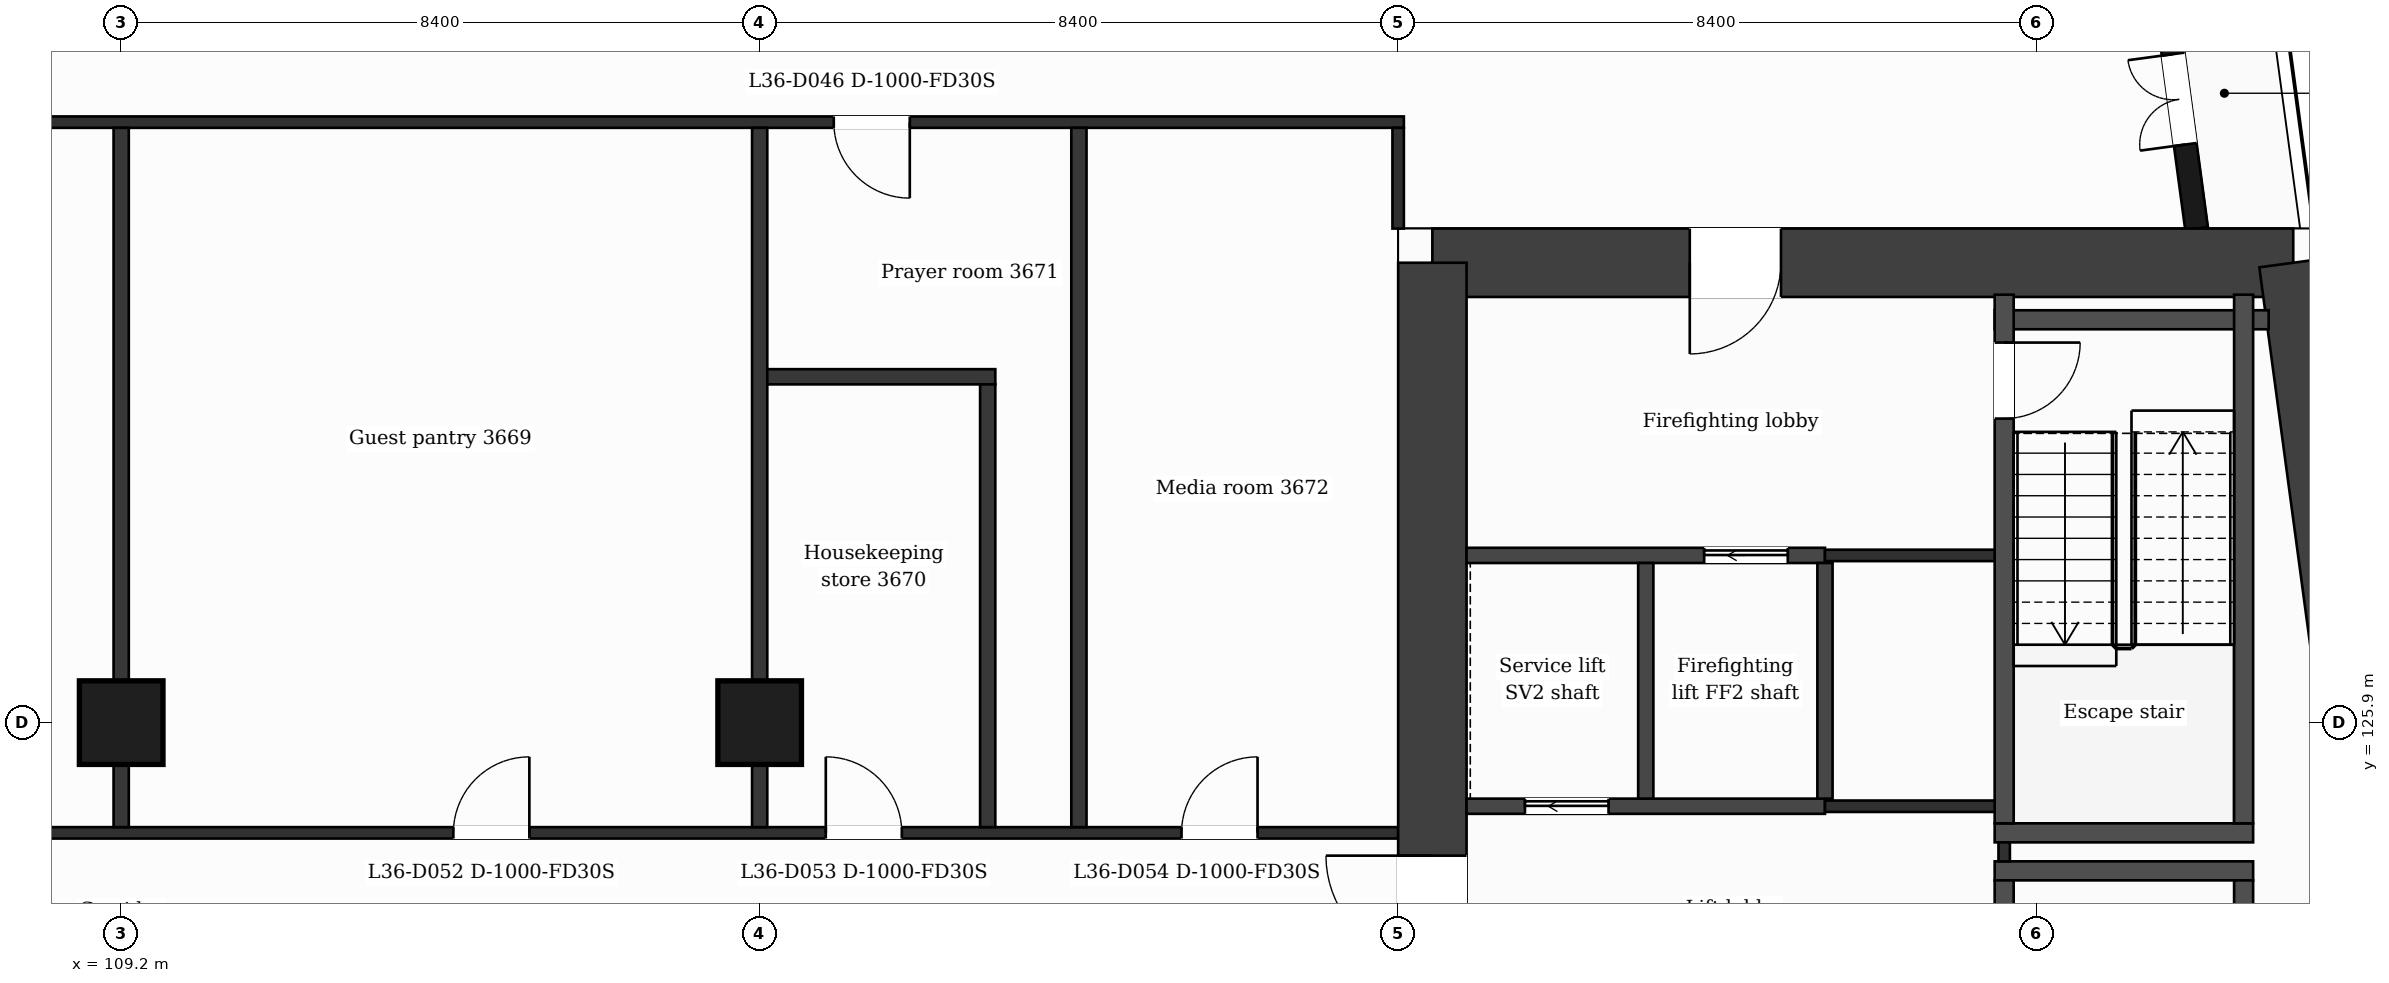
"""IFC4 building model, lengths in metres.
Left out: names, types, materials, properties, quantities, classifications, styles, units other than length and angle.
Written with IfcOpenShell. Run it as: python <this file> out.ifc"""

import sys

from ifc_helpers import new_model, si_unit, direction, frame, frame_2d, origin, origin_2d, place, context, subcontext, project, spatial, rectangle, extrude, element, fill, save


model = new_model("IFC4")
c1 = context("Model", 3, precision=1e-05, world=origin(), true_north=direction((0.0, 1.0)))
c2 = subcontext(c1, "Body", "Model", "MODEL_VIEW")
j1 = project(units=[si_unit("LENGTHUNIT", "METRE"), si_unit("PLANEANGLEUNIT", "RADIAN")], contexts=[c1])
p1 = place(None, origin())
s1 = spatial("IfcSite", under=j1, at=p1, CompositionType="ELEMENT")
p2 = place(p1, origin())
s2 = spatial("IfcBuilding", under=s1, at=p2, CompositionType="ELEMENT")
p3 = place(p2, frame((0.0, 0.0, 155.2)))
s3 = spatial("IfcBuildingStorey", under=s2, at=p3, CompositionType="ELEMENT", Elevation=155.2)
p4 = place(p3, frame((126.45, 131.95, 0.0), z_axis=(0.0, 0.0, 1.0), x_axis=(1.0, 0.0, 0.0)))
e1 = element("IfcWall", 1, at=p4, inside=s3, PredefinedType="SHEAR", context=c2, shape_type="SweptSolid", body=[
    extrude(rectangle(XDim=11.326, YDim=0.9, at=frame_2d((5.663, 0.0))), origin(), (0.0, 0.0, 1.0), 3.7),
])
p5 = place(p4, frame((3.386, 0.0, 0.0)))
e2 = element("IfcOpeningElement", 2, at=p5, cuts=e1, PredefinedType="OPENING", context=c2, shape_type="SweptSolid", body=[
    extrude(rectangle(XDim=1.2, YDim=2.1, at=frame_2d((0.6, 1.05))), frame((0.0, 0.46, 0.0), z_axis=(0.0, -1.0, 0.0), x_axis=(1.0, 0.0, 0.0)), (0.0, 0.0, 1.0), 0.92),
])
p6 = place(p3, frame((137.776, 131.95, 0.0), z_axis=(0.0, 0.0, 1.0), x_axis=(0.133421759112, -0.991059349482, 0.0)))
e3 = element("IfcWall", 3, at=p6, inside=s3, PredefinedType="SHEAR", context=c2, shape_type="SweptSolid", body=[
    extrude(rectangle(XDim=21.29, YDim=0.9, at=frame_2d((10.645, 0.0))), origin(), (0.0, 0.0, 1.0), 3.7),
])
p7 = place(p3, frame((126.45, 110.85, 0.0), z_axis=(0.0, 0.0, 1.0), x_axis=(0.0, 1.0, 0.0)))
e4 = element("IfcWall", 4, at=p7, inside=s3, PredefinedType="SHEAR", context=c2, shape_type="SweptSolid", body=[
    extrude(rectangle(XDim=21.1, YDim=0.9, at=frame_2d((10.55, 0.0))), origin(), (0.0, 0.0, 1.0), 3.7),
])
p8 = place(p7, frame((11.9, 0.0, 0.0)))
e5 = element("IfcOpeningElement", 5, at=p8, cuts=e4, PredefinedType="OPENING", context=c2, shape_type="SweptSolid", body=[
    extrude(rectangle(XDim=1.4, YDim=2.1, at=frame_2d((0.7, 1.05))), frame((0.0, 0.46, 0.0), z_axis=(0.0, -1.0, 0.0), x_axis=(1.0, 0.0, 0.0)), (0.0, 0.0, 1.0), 0.92),
])
for number, where, z_axis, x_axis in (
    (6, (109.2, 125.9, 0.0), (0.0, 0.0, 1.0), (1.0, 0.0, 0.0)),
    (7, (117.6, 125.9, 0.0), (0.0, 0.0, 1.0), (1.0, 0.0, 0.0)),
):
    element("IfcColumn", number, at=place(p3, frame(where, z_axis=z_axis, x_axis=x_axis)), inside=s3, PredefinedType="COLUMN", context=c2, shape_type="SweptSolid", body=[
        extrude(rectangle(XDim=1.1, YDim=1.1, at=origin_2d()), origin(), (0.0, 0.0, 1.0), 3.7),
    ])
p9 = place(p3, frame((136.504, 132.4, 0.0), z_axis=(0.0, 0.0, 1.0), x_axis=(-0.133399697462, 0.99106231929, 0.0)))
e8 = element("IfcWall", 8, at=p9, inside=s3, PredefinedType="SOLIDWALL", context=c2, shape_type="SweptSolid", body=[
    extrude(rectangle(XDim=6.74, YDim=0.3, at=frame_2d((3.37, 0.0))), origin(), (0.0, 0.0, 1.0), 3.38),
])
p10 = place(p9, frame((1.115, 0.0, 0.0)))
e9 = element("IfcOpeningElement", 9, at=p10, cuts=e8, PredefinedType="OPENING", context=c2, shape_type="SweptSolid", body=[
    extrude(rectangle(XDim=1.2, YDim=2.4, at=frame_2d((0.6, 1.2))), frame((0.0, 0.16, 0.0), z_axis=(0.0, -1.0, 0.0), x_axis=(1.0, 0.0, 0.0)), (0.0, 0.0, 1.0), 0.32),
])
p11 = place(p9, frame((3.835, 0.0, 0.9)))
e10 = element("IfcOpeningElement", 10, at=p11, cuts=e8, PredefinedType="OPENING", context=c2, shape_type="SweptSolid", body=[
    extrude(rectangle(XDim=2.4, YDim=2.1, at=frame_2d((1.2, 1.05))), frame((0.0, 0.16, 0.0), z_axis=(0.0, -1.0, 0.0), x_axis=(1.0, 0.0, 0.0)), (0.0, 0.0, 1.0), 0.32),
])
for number, where, z_axis, x_axis in (
    (11, (133.848, 123.95, 0.0), (0.0, 0.0, 1.0), (1.0, 0.0, 0.0)),
    (12, (133.848, 124.45, 0.0), (0.0, 0.0, 1.0), (1.0, 0.0, 0.0)),
):
    element("IfcWall", number, at=place(p3, frame(where, z_axis=z_axis, x_axis=x_axis)), inside=s3, PredefinedType="PARTITIONING", context=c2, shape_type="SweptSolid", body=[
        extrude(rectangle(XDim=3.4, YDim=0.25, at=frame_2d((1.7, 0.0))), origin(), (0.0, 0.0, 1.0), 3.38),
    ])
p12 = place(p3, frame((100.8, 124.45, 0.0), z_axis=(0.0, 0.0, 1.0), x_axis=(1.0, 0.0, 0.0)))
e13 = element("IfcWall", 13, at=p12, inside=s3, PredefinedType="PARTITIONING", context=c2, shape_type="SweptSolid", body=[
    extrude(rectangle(XDim=25.2, YDim=0.15, at=frame_2d((12.6, 0.0))), origin(), (0.0, 0.0, 1.0), 3.38),
])
p13 = place(p12, frame((3.03, 0.0, 0.0)))
e14 = element("IfcOpeningElement", 14, at=p13, cuts=e13, PredefinedType="OPENING", context=c2, shape_type="SweptSolid", body=[
    extrude(rectangle(XDim=1.0, YDim=2.1, at=frame_2d((0.5, 1.05))), frame((0.0, 0.085, 0.0), z_axis=(0.0, -1.0, 0.0), x_axis=(1.0, 0.0, 0.0)), (0.0, 0.0, 1.0), 0.17),
])
p14 = place(p12, frame((12.77, 0.0, 0.0)))
e15 = element("IfcOpeningElement", 15, at=p14, cuts=e13, PredefinedType="OPENING", context=c2, shape_type="SweptSolid", body=[
    extrude(rectangle(XDim=1.0, YDim=2.1, at=frame_2d((0.5, 1.05))), frame((0.0, 0.085, 0.0), z_axis=(0.0, -1.0, 0.0), x_axis=(1.0, 0.0, 0.0)), (0.0, 0.0, 1.0), 0.17),
])
p15 = place(p12, frame((17.67, 0.0, 0.0)))
e16 = element("IfcOpeningElement", 16, at=p15, cuts=e13, PredefinedType="OPENING", context=c2, shape_type="SweptSolid", body=[
    extrude(rectangle(XDim=1.0, YDim=2.1, at=frame_2d((0.5, 1.05))), frame((0.0, 0.085, 0.0), z_axis=(0.0, -1.0, 0.0), x_axis=(1.0, 0.0, 0.0)), (0.0, 0.0, 1.0), 0.17),
])
p16 = place(p12, frame((22.35, 0.0, 0.0)))
e17 = element("IfcOpeningElement", 17, at=p16, cuts=e13, PredefinedType="OPENING", context=c2, shape_type="SweptSolid", body=[
    extrude(rectangle(XDim=1.0, YDim=2.1, at=frame_2d((0.5, 1.05))), frame((0.0, 0.085, 0.0), z_axis=(0.0, -1.0, 0.0), x_axis=(1.0, 0.0, 0.0)), (0.0, 0.0, 1.0), 0.17),
])
p17 = place(p3, frame((126.9, 124.8, 0.0), z_axis=(0.0, 0.0, 1.0), x_axis=(1.0, 0.0, 0.0)))
e18 = element("IfcWall", 18, at=p17, inside=s3, PredefinedType="PARTITIONING", context=c2, shape_type="SweptSolid", body=[
    extrude(rectangle(XDim=4.715, YDim=0.2, at=frame_2d((2.358, 0.0))), origin(), (0.0, 0.0, 1.0), 3.38),
])
p18 = place(p17, frame((0.768, 0.0, 0.0)))
e19 = element("IfcOpeningElement", 19, at=p18, cuts=e18, PredefinedType="OPENING", context=c2, shape_type="SweptSolid", body=[
    extrude(rectangle(XDim=1.1, YDim=2.1, at=frame_2d((0.55, 1.05))), frame((0.0, 0.11, 0.0), z_axis=(0.0, -1.0, 0.0), x_axis=(1.0, 0.0, 0.0)), (0.0, 0.0, 1.0), 0.22),
])
p19 = place(p3, frame((131.615, 124.8, 0.0), z_axis=(0.0, 0.0, 1.0), x_axis=(1.0, 0.0, 0.0)))
e20 = element("IfcWall", 20, at=p19, inside=s3, PredefinedType="PARTITIONING", context=c2, shape_type="SweptSolid", body=[
    extrude(rectangle(XDim=2.483, YDim=0.15, at=frame_2d((1.241, 0.0))), origin(), (0.0, 0.0, 1.0), 3.38),
])
p20 = place(p3, frame((126.9, 128.1, 0.0), z_axis=(0.0, 0.0, 1.0), x_axis=(1.0, 0.0, 0.0)))
e21 = element("IfcWall", 21, at=p20, inside=s3, PredefinedType="PARTITIONING", context=c2, shape_type="SweptSolid", body=[
    extrude(rectangle(XDim=4.715, YDim=0.2, at=frame_2d((2.358, 0.0))), origin(), (0.0, 0.0, 1.0), 3.38),
])
p21 = place(p20, frame((3.126, 0.0, 0.0)))
e22 = element("IfcOpeningElement", 22, at=p21, cuts=e21, PredefinedType="OPENING", context=c2, shape_type="SweptSolid", body=[
    extrude(rectangle(XDim=1.1, YDim=2.1, at=frame_2d((0.55, 1.05))), frame((0.0, 0.11, 0.0), z_axis=(0.0, -1.0, 0.0), x_axis=(1.0, 0.0, 0.0)), (0.0, 0.0, 1.0), 0.22),
])
p22 = place(p3, frame((131.615, 128.1, 0.0), z_axis=(0.0, 0.0, 1.0), x_axis=(1.0, 0.0, 0.0)))
e23 = element("IfcWall", 23, at=p22, inside=s3, PredefinedType="PARTITIONING", context=c2, shape_type="SweptSolid", body=[
    extrude(rectangle(XDim=2.358, YDim=0.15, at=frame_2d((1.179, 0.0))), origin(), (0.0, 0.0, 1.0), 3.38),
])
p23 = place(p3, frame((117.6, 130.45, 0.0), z_axis=(0.0, 0.0, 1.0), x_axis=(1.0, 0.0, 0.0)))
e24 = element("IfcWall", 24, at=p23, inside=s3, PredefinedType="PARTITIONING", context=c2, shape_type="SweptSolid", body=[
    extrude(rectangle(XDim=3.1, YDim=0.2, at=frame_2d((1.55, 0.0))), origin(), (0.0, 0.0, 1.0), 3.38),
])
p24 = place(p3, frame((133.848, 131.2, 0.0), z_axis=(0.0, 0.0, 1.0), x_axis=(1.0, 0.0, 0.0)))
e25 = element("IfcWall", 25, at=p24, inside=s3, PredefinedType="PARTITIONING", context=c2, shape_type="SweptSolid", body=[
    extrude(rectangle(XDim=3.605, YDim=0.25, at=frame_2d((1.802, 0.0))), origin(), (0.0, 0.0, 1.0), 3.38),
])
p25 = place(p3, frame((100.725, 133.8, 0.0), z_axis=(0.0, 0.0, 1.0), x_axis=(1.0, 0.0, 0.0)))
e26 = element("IfcWall", 26, at=p25, inside=s3, PredefinedType="PARTITIONING", context=c2, shape_type="SweptSolid", body=[
    extrude(rectangle(XDim=25.35, YDim=0.15, at=frame_2d((12.675, 0.0))), origin(), (0.0, 0.0, 1.0), 3.38),
])
p26 = place(p25, frame((17.85, 0.0, 0.0)))
e27 = element("IfcOpeningElement", 27, at=p26, cuts=e26, PredefinedType="OPENING", context=c2, shape_type="SweptSolid", body=[
    extrude(rectangle(XDim=1.0, YDim=2.1, at=frame_2d((0.5, 1.05))), frame((0.0, 0.085, 0.0), z_axis=(0.0, -1.0, 0.0), x_axis=(1.0, 0.0, 0.0)), (0.0, 0.0, 1.0), 0.17),
])
for number, where, z_axis, x_axis in (
    (28, (109.2, 124.525, 0.0), (0.0, 0.0, 1.0), (0.0, 1.0, 0.0)),
    (29, (117.6, 124.525, 0.0), (0.0, 0.0, 1.0), (0.0, 1.0, 0.0)),
):
    element("IfcWall", number, at=place(p3, frame(where, z_axis=z_axis, x_axis=x_axis)), inside=s3, PredefinedType="PARTITIONING", context=c2, shape_type="SweptSolid", body=[
        extrude(rectangle(XDim=9.2, YDim=0.2, at=frame_2d((4.6, 0.0))), origin(), (0.0, 0.0, 1.0), 3.38),
    ])
p27 = place(p3, frame((120.6, 124.525, 0.0), z_axis=(0.0, 0.0, 1.0), x_axis=(0.0, 1.0, 0.0)))
e30 = element("IfcWall", 30, at=p27, inside=s3, PredefinedType="PARTITIONING", context=c2, shape_type="SweptSolid", body=[
    extrude(rectangle(XDim=5.825, YDim=0.2, at=frame_2d((2.913, 0.0))), origin(), (0.0, 0.0, 1.0), 3.38),
])
p28 = place(p3, frame((121.8, 124.525, 0.0), z_axis=(0.0, 0.0, 1.0), x_axis=(0.0, 1.0, 0.0)))
e31 = element("IfcWall", 31, at=p28, inside=s3, PredefinedType="PARTITIONING", context=c2, shape_type="SweptSolid", body=[
    extrude(rectangle(XDim=9.2, YDim=0.2, at=frame_2d((4.6, 0.0))), origin(), (0.0, 0.0, 1.0), 3.38),
])
p29 = place(p3, frame((126.0, 132.4, 0.0), z_axis=(0.0, 0.0, 1.0), x_axis=(0.0, 1.0, 0.0)))
e32 = element("IfcWall", 32, at=p29, inside=s3, PredefinedType="PARTITIONING", context=c2, shape_type="SweptSolid", body=[
    extrude(rectangle(XDim=1.325, YDim=0.15, at=frame_2d((0.663, 0.0))), origin(), (0.0, 0.0, 1.0), 3.38),
])
for number, where, z_axis, x_axis in (
    (33, (129.258, 124.9, 0.0), (0.0, 0.0, 1.0), (0.0, 1.0, 0.0)),
    (34, (131.615, 124.9, 0.0), (0.0, 0.0, 1.0), (0.0, 1.0, 0.0)),
):
    element("IfcWall", number, at=place(p3, frame(where, z_axis=z_axis, x_axis=x_axis)), inside=s3, PredefinedType="PARTITIONING", context=c2, shape_type="SweptSolid", body=[
        extrude(rectangle(XDim=3.1, YDim=0.2, at=frame_2d((1.55, 0.0))), origin(), (0.0, 0.0, 1.0), 3.38),
    ])
p30 = place(p3, frame((133.973, 124.075, 0.0), z_axis=(0.0, 0.0, 1.0), x_axis=(0.0, 1.0, 0.0)))
e35 = element("IfcWall", 35, at=p30, inside=s3, PredefinedType="PARTITIONING", context=c2, shape_type="SweptSolid", body=[
    extrude(rectangle(XDim=0.25, YDim=0.15, at=frame_2d((0.125, 0.0))), origin(), (0.0, 0.0, 1.0), 3.38),
])
p31 = place(p3, frame((133.973, 116.87, 0.0), z_axis=(0.0, 0.0, 1.0), x_axis=(0.0, 1.0, 0.0)))
e36 = element("IfcWall", 36, at=p31, inside=s3, PredefinedType="PARTITIONING", context=c2, shape_type="SweptSolid", body=[
    extrude(rectangle(XDim=6.955, YDim=0.25, at=frame_2d((3.478, 0.0))), origin(), (0.0, 0.0, 1.0), 3.38),
])
p32 = place(p31, frame((5.655, 0.0, 0.0)))
e37 = element("IfcOpeningElement", 37, at=p32, cuts=e36, PredefinedType="OPENING", context=c2, shape_type="SweptSolid", body=[
    extrude(rectangle(XDim=0.95, YDim=2.1, at=frame_2d((0.475, 1.05))), frame((0.0, 0.135, 0.0), z_axis=(0.0, -1.0, 0.0), x_axis=(1.0, 0.0, 0.0)), (0.0, 0.0, 1.0), 0.27),
])
p33 = place(p3, frame((133.973, 124.575, 0.0), z_axis=(0.0, 0.0, 1.0), x_axis=(0.0, 1.0, 0.0)))
e38 = element("IfcWall", 38, at=p33, inside=s3, PredefinedType="PARTITIONING", context=c2, shape_type="SweptSolid", body=[
    extrude(rectangle(XDim=6.955, YDim=0.25, at=frame_2d((3.478, 0.0))), origin(), (0.0, 0.0, 1.0), 3.38),
])
p34 = place(p33, frame((5.325, 0.0, 0.0)))
e39 = element("IfcOpeningElement", 39, at=p34, cuts=e38, PredefinedType="OPENING", context=c2, shape_type="SweptSolid", body=[
    extrude(rectangle(XDim=1.0, YDim=2.1, at=frame_2d((0.5, 1.05))), frame((0.0, 0.135, 0.0), z_axis=(0.0, -1.0, 0.0), x_axis=(1.0, 0.0, 0.0)), (0.0, 0.0, 1.0), 0.27),
])
p35 = place(p3, frame((137.123, 116.87, 0.0), z_axis=(0.0, 0.0, 1.0), x_axis=(0.0, 1.0, 0.0)))
e40 = element("IfcWall", 40, at=p35, inside=s3, PredefinedType="PARTITIONING", context=c2, shape_type="SweptSolid", body=[
    extrude(rectangle(XDim=6.955, YDim=0.25, at=frame_2d((3.478, 0.0))), origin(), (0.0, 0.0, 1.0), 3.38),
])
p36 = place(p3, frame((137.123, 124.575, 0.0), z_axis=(0.0, 0.0, 1.0), x_axis=(0.0, 1.0, 0.0)))
e41 = element("IfcWall", 41, at=p36, inside=s3, PredefinedType="PARTITIONING", context=c2, shape_type="SweptSolid", body=[
    extrude(rectangle(XDim=6.955, YDim=0.25, at=frame_2d((3.478, 0.0))), origin(), (0.0, 0.0, 1.0), 3.38),
])
p37 = place(p10, origin())
e42 = element("IfcDoor", 42, at=p37, inside=s3, OperationType="DOUBLE_DOOR_SINGLE_SWING", PredefinedType="DOOR", context=c2, shape_type="SweptSolid", body=[
    extrude(rectangle(XDim=1.2, YDim=2.4, at=frame_2d((0.6, 1.2))), frame((0.0, 0.025, 0.0), z_axis=(0.0, -1.0, 0.0), x_axis=(1.0, 0.0, 0.0)), (0.0, 0.0, 1.0), 0.05),
])
fill(e9, e42)
p38 = place(p21, origin())
e43 = element("IfcDoor", 43, at=p38, inside=s3, OperationType="SLIDING_TO_LEFT", PredefinedType="DOOR", context=c2, shape_type="SweptSolid", body=[
    extrude(rectangle(XDim=1.1, YDim=2.1, at=frame_2d((0.55, 1.05))), frame((0.0, 0.025, 0.0), z_axis=(0.0, -1.0, 0.0), x_axis=(1.0, 0.0, 0.0)), (0.0, 0.0, 1.0), 0.05),
])
fill(e22, e43)
p39 = place(p18, origin())
e44 = element("IfcDoor", 44, at=p39, inside=s3, OperationType="SLIDING_TO_LEFT", PredefinedType="DOOR", context=c2, shape_type="SweptSolid", body=[
    extrude(rectangle(XDim=1.1, YDim=2.1, at=frame_2d((0.55, 1.05))), frame((0.0, 0.025, 0.0), z_axis=(0.0, -1.0, 0.0), x_axis=(1.0, 0.0, 0.0)), (0.0, 0.0, 1.0), 0.05),
])
fill(e19, e44)
p40 = place(p34, origin())
e45 = element("IfcDoor", 45, at=p40, inside=s3, OperationType="SINGLE_SWING_RIGHT", PredefinedType="DOOR", context=c2, shape_type="SweptSolid", body=[
    extrude(rectangle(XDim=1.0, YDim=2.1, at=frame_2d((0.5, 1.05))), frame((0.0, 0.025, 0.0), z_axis=(0.0, -1.0, 0.0), x_axis=(1.0, 0.0, 0.0)), (0.0, 0.0, 1.0), 0.05),
])
fill(e39, e45)
p41 = place(p26, origin())
e46 = element("IfcDoor", 46, at=p41, inside=s3, OperationType="SINGLE_SWING_RIGHT", PredefinedType="DOOR", context=c2, shape_type="SweptSolid", body=[
    extrude(rectangle(XDim=1.0, YDim=2.1, at=frame_2d((0.5, 1.05))), frame((0.0, 0.025, 0.0), z_axis=(0.0, -1.0, 0.0), x_axis=(1.0, 0.0, 0.0)), (0.0, 0.0, 1.0), 0.05),
])
fill(e27, e46)
p42 = place(p14, origin())
e47 = element("IfcDoor", 47, at=p42, inside=s3, OperationType="SINGLE_SWING_RIGHT", PredefinedType="DOOR", context=c2, shape_type="SweptSolid", body=[
    extrude(rectangle(XDim=1.0, YDim=2.1, at=frame_2d((0.5, 1.05))), frame((0.0, 0.025, 0.0), z_axis=(0.0, -1.0, 0.0), x_axis=(1.0, 0.0, 0.0)), (0.0, 0.0, 1.0), 0.05),
])
fill(e15, e47)
p43 = place(p15, origin())
e48 = element("IfcDoor", 48, at=p43, inside=s3, OperationType="SINGLE_SWING_LEFT", PredefinedType="DOOR", context=c2, shape_type="SweptSolid", body=[
    extrude(rectangle(XDim=1.0, YDim=2.1, at=frame_2d((0.5, 1.05))), frame((0.0, 0.025, 0.0), z_axis=(0.0, -1.0, 0.0), x_axis=(1.0, 0.0, 0.0)), (0.0, 0.0, 1.0), 0.05),
])
fill(e16, e48)
p44 = place(p16, origin())
e49 = element("IfcDoor", 49, at=p44, inside=s3, OperationType="SINGLE_SWING_RIGHT", PredefinedType="DOOR", context=c2, shape_type="SweptSolid", body=[
    extrude(rectangle(XDim=1.0, YDim=2.1, at=frame_2d((0.5, 1.05))), frame((0.0, 0.025, 0.0), z_axis=(0.0, -1.0, 0.0), x_axis=(1.0, 0.0, 0.0)), (0.0, 0.0, 1.0), 0.05),
])
fill(e17, e49)
p45 = place(p5, origin())
e50 = element("IfcDoor", 50, at=p45, inside=s3, OperationType="SINGLE_SWING_LEFT", PredefinedType="DOOR", context=c2, shape_type="SweptSolid", body=[
    extrude(rectangle(XDim=1.2, YDim=2.1, at=frame_2d((0.6, 1.05))), frame((0.0, 0.025, 0.0), z_axis=(0.0, -1.0, 0.0), x_axis=(1.0, 0.0, 0.0)), (0.0, 0.0, 1.0), 0.05),
])
fill(e2, e50)
p46 = place(p8, origin())
e51 = element("IfcDoor", 51, at=p46, inside=s3, OperationType="SINGLE_SWING_RIGHT", PredefinedType="DOOR", context=c2, shape_type="SweptSolid", body=[
    extrude(rectangle(XDim=1.4, YDim=2.1, at=frame_2d((0.7, 1.05))), frame((0.0, 0.025, 0.0), z_axis=(0.0, -1.0, 0.0), x_axis=(1.0, 0.0, 0.0)), (0.0, 0.0, 1.0), 0.05),
])
fill(e5, e51)
save(model, sys.argv[1])
